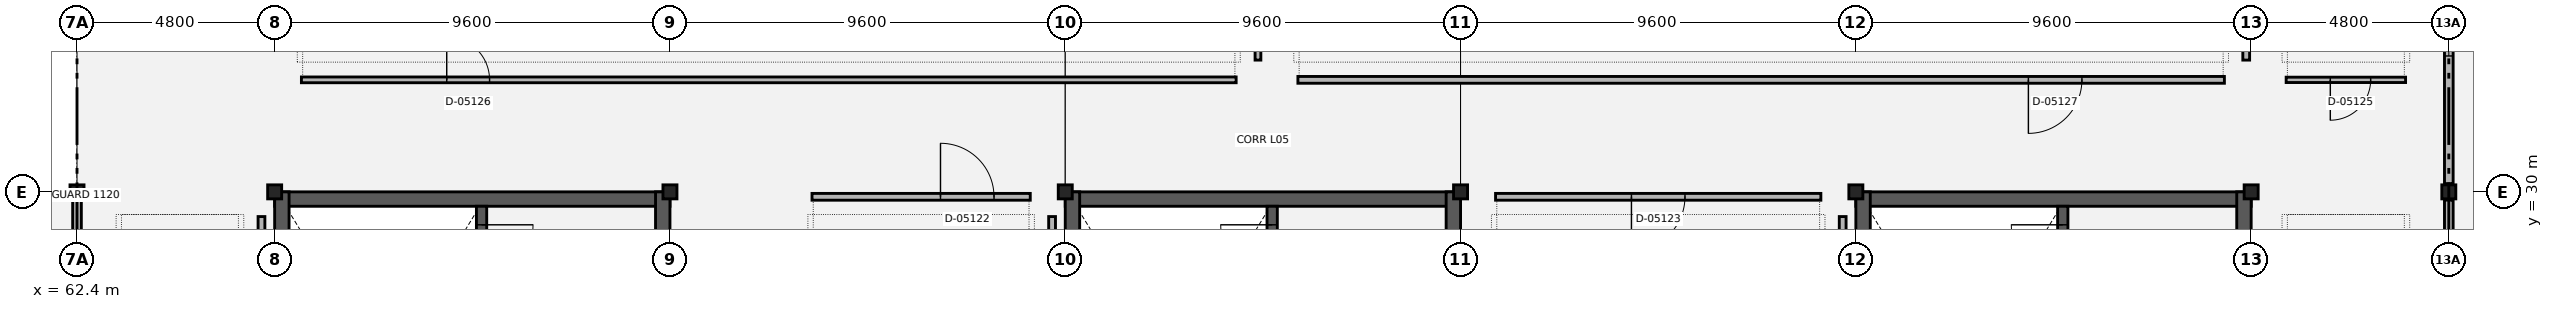
"""IFC4 building model, lengths in metres.
Left out: names, types, materials, properties, quantities, classifications, styles, units other than length and angle.
Written with IfcOpenShell. Run it as: python <this file> out.ifc"""

import sys

from ifc_helpers import new_model, si_unit, direction, frame, frame_2d, origin, origin_2d, place, context, subcontext, project, spatial, rectangle, extrude, element, fill, save


model = new_model("IFC4")
c1 = context("Model", 3, precision=1e-05, world=origin(), true_north=direction((0.0, 1.0)))
c2 = subcontext(c1, "Body", "Model", "MODEL_VIEW")
j1 = project(units=[si_unit("LENGTHUNIT", "METRE"), si_unit("PLANEANGLEUNIT", "RADIAN")], contexts=[c1])
p1 = place(None, origin())
s1 = spatial("IfcSite", under=j1, at=p1, CompositionType="ELEMENT")
p2 = place(p1, origin())
s2 = spatial("IfcBuilding", under=s1, at=p2, CompositionType="ELEMENT")
p3 = place(p2, frame((0.0, 0.0, 22.8)))
s3 = spatial("IfcBuildingStorey", under=s2, at=p3, CompositionType="ELEMENT", Elevation=22.8)
for number, where, z_axis, x_axis in (
    (1, (62.4, 30.0, 0.0), (0.0, 0.0, 1.0), (1.0, 0.0, 0.0)),
    (2, (67.2, 30.0, 0.0), (0.0, 0.0, 1.0), (1.0, 0.0, 0.0)),
    (3, (76.8, 30.0, 0.0), (0.0, 0.0, 1.0), (1.0, 0.0, 0.0)),
    (4, (86.4, 30.0, 0.0), (0.0, 0.0, 1.0), (1.0, 0.0, 0.0)),
    (5, (96.0, 30.0, 0.0), (0.0, 0.0, 1.0), (1.0, 0.0, 0.0)),
    (6, (105.6, 30.0, 0.0), (0.0, 0.0, 1.0), (1.0, 0.0, 0.0)),
    (7, (115.2, 30.0, 0.0), (0.0, 0.0, 1.0), (1.0, 0.0, 0.0)),
    (8, (120.0, 30.0, 0.0), (0.0, 0.0, 1.0), (1.0, 0.0, 0.0)),
):
    element("IfcColumn", number, at=place(p3, frame(where, z_axis=z_axis, x_axis=x_axis)), inside=s3, PredefinedType="COLUMN", context=c2, shape_type="SweptSolid", body=[
        extrude(rectangle(XDim=0.34, YDim=0.34, at=origin_2d()), origin(), (0.0, 0.0, 1.0), 4.2),
    ])
p4 = place(p3, frame((62.4, 29.8, 0.0), z_axis=(0.0, 0.0, 1.0), x_axis=(0.0, -1.0, 0.0)))
e9 = element("IfcWall", 9, at=p4, inside=s3, PredefinedType="SOLIDWALL", context=c2, shape_type="SweptSolid", body=[
    extrude(rectangle(XDim=8.0, YDim=0.21, at=frame_2d((4.0, 0.0))), origin(), (0.0, 0.0, 1.0), 3.07),
])
p5 = place(p4, frame((3.4, 0.0, 0.0)))
e10 = element("IfcOpeningElement", 10, at=p5, cuts=e9, PredefinedType="OPENING", context=c2, shape_type="SweptSolid", body=[
    extrude(rectangle(XDim=1.2, YDim=2.15, at=frame_2d((0.6, 1.075))), frame((0.0, 0.115, 0.0), z_axis=(0.0, -1.0, 0.0), x_axis=(1.0, 0.0, 0.0)), (0.0, 0.0, 1.0), 0.23),
])
p6 = place(p3, frame((120.0, 21.8, 0.0), z_axis=(0.0, 0.0, 1.0), x_axis=(0.0, 1.0, 0.0)))
e11 = element("IfcWall", 11, at=p6, inside=s3, PredefinedType="SOLIDWALL", context=c2, shape_type="SweptSolid", body=[
    extrude(rectangle(XDim=8.0, YDim=0.21, at=frame_2d((4.0, 0.0))), origin(), (0.0, 0.0, 1.0), 3.07),
])
p7 = place(p6, frame((3.1, 0.0, 0.9)))
e12 = element("IfcOpeningElement", 12, at=p7, cuts=e11, PredefinedType="OPENING", context=c2, shape_type="SweptSolid", body=[
    extrude(rectangle(XDim=1.8, YDim=1.5, at=frame_2d((0.9, 0.75))), frame((0.0, 0.115, 0.0), z_axis=(0.0, -1.0, 0.0), x_axis=(1.0, 0.0, 0.0)), (0.0, 0.0, 1.0), 0.23),
])
p8 = place(p3, frame((120.0, 30.2, 0.0), z_axis=(0.0, 0.0, 1.0), x_axis=(0.0, 1.0, 0.0)))
e13 = element("IfcWall", 13, at=p8, inside=s3, PredefinedType="SOLIDWALL", context=c2, shape_type="SweptSolid", body=[
    extrude(rectangle(XDim=8.0, YDim=0.21, at=frame_2d((4.0, 0.0))), origin(), (0.0, 0.0, 1.0), 3.07),
])
p9 = place(p8, frame((3.1, 0.0, 0.9)))
e14 = element("IfcOpeningElement", 14, at=p9, cuts=e13, PredefinedType="OPENING", context=c2, shape_type="SweptSolid", body=[
    extrude(rectangle(XDim=1.8, YDim=1.5, at=frame_2d((0.9, 0.75))), frame((0.0, 0.115, 0.0), z_axis=(0.0, -1.0, 0.0), x_axis=(1.0, 0.0, 0.0)), (0.0, 0.0, 1.0), 0.23),
])
p10 = place(p3, frame((67.2, 29.825, 0.0), z_axis=(0.0, 0.0, 1.0), x_axis=(1.0, 0.0, 0.0)))
e15 = element("IfcWall", 15, at=p10, inside=s3, PredefinedType="SHEAR", context=c2, shape_type="SweptSolid", body=[
    extrude(rectangle(XDim=9.6, YDim=0.35, at=frame_2d((4.8, 0.0))), origin(), (0.0, 0.0, 1.0), 3.97),
])
p11 = place(p3, frame((67.375, 21.6, 0.0), z_axis=(0.0, 0.0, 1.0), x_axis=(0.0, 1.0, 0.0)))
e16 = element("IfcWall", 16, at=p11, inside=s3, PredefinedType="SHEAR", context=c2, shape_type="SweptSolid", body=[
    extrude(rectangle(XDim=8.4, YDim=0.35, at=frame_2d((4.2, 0.0))), origin(), (0.0, 0.0, 1.0), 3.97),
])
p12 = place(p3, frame((76.625, 21.6, 0.0), z_axis=(0.0, 0.0, 1.0), x_axis=(0.0, 1.0, 0.0)))
e17 = element("IfcWall", 17, at=p12, inside=s3, PredefinedType="SHEAR", context=c2, shape_type="SweptSolid", body=[
    extrude(rectangle(XDim=8.4, YDim=0.35, at=frame_2d((4.2, 0.0))), origin(), (0.0, 0.0, 1.0), 3.97),
])
p13 = place(p12, frame((5.3, 0.0, 0.0)))
e18 = element("IfcOpeningElement", 18, at=p13, cuts=e17, PredefinedType="OPENING", context=c2, shape_type="SweptSolid", body=[
    extrude(rectangle(XDim=1.4, YDim=2.15, at=frame_2d((0.7, 1.075))), frame((0.0, 0.185, 0.0), z_axis=(0.0, -1.0, 0.0), x_axis=(1.0, 0.0, 0.0)), (0.0, 0.0, 1.0), 0.37),
])
p14 = place(p3, frame((72.225, 29.65, 0.0), z_axis=(0.0, 0.0, 1.0), x_axis=(0.0, -1.0, 0.0)))
e19 = element("IfcWall", 19, at=p14, inside=s3, PredefinedType="SHEAR", context=c2, shape_type="SweptSolid", body=[
    extrude(rectangle(XDim=7.7, YDim=0.25, at=frame_2d((3.85, 0.0))), origin(), (0.0, 0.0, 1.0), 3.97),
])
p15 = place(p14, frame((0.45, 0.0, 0.0)))
e20 = element("IfcOpeningElement", 20, at=p15, cuts=e19, PredefinedType="OPENING", context=c2, shape_type="SweptSolid", body=[
    extrude(rectangle(XDim=1.25, YDim=2.15, at=frame_2d((0.625, 1.075))), frame((0.0, 0.135, 0.0), z_axis=(0.0, -1.0, 0.0), x_axis=(1.0, 0.0, 0.0)), (0.0, 0.0, 1.0), 0.27),
])
p16 = place(p3, frame((105.6, 29.825, 0.0), z_axis=(0.0, 0.0, 1.0), x_axis=(1.0, 0.0, 0.0)))
e21 = element("IfcWall", 21, at=p16, inside=s3, PredefinedType="SHEAR", context=c2, shape_type="SweptSolid", body=[
    extrude(rectangle(XDim=9.6, YDim=0.35, at=frame_2d((4.8, 0.0))), origin(), (0.0, 0.0, 1.0), 3.97),
])
p17 = place(p3, frame((105.775, 21.6, 0.0), z_axis=(0.0, 0.0, 1.0), x_axis=(0.0, 1.0, 0.0)))
e22 = element("IfcWall", 22, at=p17, inside=s3, PredefinedType="SHEAR", context=c2, shape_type="SweptSolid", body=[
    extrude(rectangle(XDim=8.4, YDim=0.35, at=frame_2d((4.2, 0.0))), origin(), (0.0, 0.0, 1.0), 3.97),
])
p18 = place(p3, frame((115.025, 21.6, 0.0), z_axis=(0.0, 0.0, 1.0), x_axis=(0.0, 1.0, 0.0)))
e23 = element("IfcWall", 23, at=p18, inside=s3, PredefinedType="SHEAR", context=c2, shape_type="SweptSolid", body=[
    extrude(rectangle(XDim=8.4, YDim=0.35, at=frame_2d((4.2, 0.0))), origin(), (0.0, 0.0, 1.0), 3.97),
])
p19 = place(p18, frame((5.3, 0.0, 0.0)))
e24 = element("IfcOpeningElement", 24, at=p19, cuts=e23, PredefinedType="OPENING", context=c2, shape_type="SweptSolid", body=[
    extrude(rectangle(XDim=1.4, YDim=2.15, at=frame_2d((0.7, 1.075))), frame((0.0, 0.185, 0.0), z_axis=(0.0, -1.0, 0.0), x_axis=(1.0, 0.0, 0.0)), (0.0, 0.0, 1.0), 0.37),
])
p20 = place(p3, frame((110.625, 29.65, 0.0), z_axis=(0.0, 0.0, 1.0), x_axis=(0.0, -1.0, 0.0)))
e25 = element("IfcWall", 25, at=p20, inside=s3, PredefinedType="SHEAR", context=c2, shape_type="SweptSolid", body=[
    extrude(rectangle(XDim=7.7, YDim=0.25, at=frame_2d((3.85, 0.0))), origin(), (0.0, 0.0, 1.0), 3.97),
])
p21 = place(p20, frame((0.45, 0.0, 0.0)))
e26 = element("IfcOpeningElement", 26, at=p21, cuts=e25, PredefinedType="OPENING", context=c2, shape_type="SweptSolid", body=[
    extrude(rectangle(XDim=1.25, YDim=2.15, at=frame_2d((0.625, 1.075))), frame((0.0, 0.135, 0.0), z_axis=(0.0, -1.0, 0.0), x_axis=(1.0, 0.0, 0.0)), (0.0, 0.0, 1.0), 0.27),
])
p22 = place(p3, frame((86.4, 29.825, 0.0), z_axis=(0.0, 0.0, 1.0), x_axis=(1.0, 0.0, 0.0)))
e27 = element("IfcWall", 27, at=p22, inside=s3, PredefinedType="SHEAR", context=c2, shape_type="SweptSolid", body=[
    extrude(rectangle(XDim=9.6, YDim=0.35, at=frame_2d((4.8, 0.0))), origin(), (0.0, 0.0, 1.0), 3.97),
])
p23 = place(p3, frame((86.575, 21.6, 0.0), z_axis=(0.0, 0.0, 1.0), x_axis=(0.0, 1.0, 0.0)))
e28 = element("IfcWall", 28, at=p23, inside=s3, PredefinedType="SHEAR", context=c2, shape_type="SweptSolid", body=[
    extrude(rectangle(XDim=8.4, YDim=0.35, at=frame_2d((4.2, 0.0))), origin(), (0.0, 0.0, 1.0), 3.97),
])
p24 = place(p3, frame((95.825, 21.6, 0.0), z_axis=(0.0, 0.0, 1.0), x_axis=(0.0, 1.0, 0.0)))
e29 = element("IfcWall", 29, at=p24, inside=s3, PredefinedType="SHEAR", context=c2, shape_type="SweptSolid", body=[
    extrude(rectangle(XDim=8.4, YDim=0.35, at=frame_2d((4.2, 0.0))), origin(), (0.0, 0.0, 1.0), 3.97),
])
p25 = place(p24, frame((5.3, 0.0, 0.0)))
e30 = element("IfcOpeningElement", 30, at=p25, cuts=e29, PredefinedType="OPENING", context=c2, shape_type="SweptSolid", body=[
    extrude(rectangle(XDim=1.4, YDim=2.15, at=frame_2d((0.7, 1.075))), frame((0.0, 0.185, 0.0), z_axis=(0.0, -1.0, 0.0), x_axis=(1.0, 0.0, 0.0)), (0.0, 0.0, 1.0), 0.37),
])
p26 = place(p3, frame((91.425, 29.65, 0.0), z_axis=(0.0, 0.0, 1.0), x_axis=(0.0, -1.0, 0.0)))
e31 = element("IfcWall", 31, at=p26, inside=s3, PredefinedType="SHEAR", context=c2, shape_type="SweptSolid", body=[
    extrude(rectangle(XDim=7.7, YDim=0.25, at=frame_2d((3.85, 0.0))), origin(), (0.0, 0.0, 1.0), 3.97),
])
p27 = place(p26, frame((0.45, 0.0, 0.0)))
e32 = element("IfcOpeningElement", 32, at=p27, cuts=e31, PredefinedType="OPENING", context=c2, shape_type="SweptSolid", body=[
    extrude(rectangle(XDim=1.25, YDim=2.15, at=frame_2d((0.625, 1.075))), frame((0.0, 0.135, 0.0), z_axis=(0.0, -1.0, 0.0), x_axis=(1.0, 0.0, 0.0)), (0.0, 0.0, 1.0), 0.27),
])
p28 = place(p3, frame((66.88, 22.4, 0.0), z_axis=(0.0, 0.0, 1.0), x_axis=(0.0, 1.0, 0.0)))
e33 = element("IfcWall", 33, at=p28, inside=s3, PredefinedType="PARTITIONING", context=c2, shape_type="SweptSolid", body=[
    extrude(rectangle(XDim=7.0, YDim=0.165, at=frame_2d((3.5, 0.0))), origin(), (0.0, 0.0, 1.0), 3.05),
])
p29 = place(p3, frame((80.25, 29.88, 0.0), z_axis=(0.0, 0.0, 1.0), x_axis=(1.0, 0.0, 0.0)))
e34 = element("IfcWall", 34, at=p29, inside=s3, PredefinedType="PARTITIONING", context=c2, shape_type="SweptSolid", body=[
    extrude(rectangle(XDim=5.3, YDim=0.165, at=frame_2d((2.65, 0.0))), origin(), (0.0, 0.0, 1.0), 3.05),
])
p30 = place(p29, frame((3.12, 0.0, 0.0)))
e35 = element("IfcOpeningElement", 35, at=p30, cuts=e34, PredefinedType="OPENING", context=c2, shape_type="SweptSolid", body=[
    extrude(rectangle(XDim=1.3, YDim=2.15, at=frame_2d((0.65, 1.075))), frame((0.0, 0.093, 0.0), z_axis=(0.0, -1.0, 0.0), x_axis=(1.0, 0.0, 0.0)), (0.0, 0.0, 1.0), 0.185),
])
p31 = place(p3, frame((86.08, 22.4, 0.0), z_axis=(0.0, 0.0, 1.0), x_axis=(0.0, 1.0, 0.0)))
e36 = element("IfcWall", 36, at=p31, inside=s3, PredefinedType="PARTITIONING", context=c2, shape_type="SweptSolid", body=[
    extrude(rectangle(XDim=7.0, YDim=0.165, at=frame_2d((3.5, 0.0))), origin(), (0.0, 0.0, 1.0), 3.05),
])
p32 = place(p3, frame((96.85, 29.88, 0.0), z_axis=(0.0, 0.0, 1.0), x_axis=(1.0, 0.0, 0.0)))
e37 = element("IfcWall", 37, at=p32, inside=s3, PredefinedType="PARTITIONING", context=c2, shape_type="SweptSolid", body=[
    extrude(rectangle(XDim=7.9, YDim=0.165, at=frame_2d((3.95, 0.0))), origin(), (0.0, 0.0, 1.0), 3.05),
])
p33 = place(p32, frame((3.3, 0.0, 0.0)))
e38 = element("IfcOpeningElement", 38, at=p33, cuts=e37, PredefinedType="OPENING", context=c2, shape_type="SweptSolid", body=[
    extrude(rectangle(XDim=1.3, YDim=2.15, at=frame_2d((0.65, 1.075))), frame((0.0, 0.093, 0.0), z_axis=(0.0, -1.0, 0.0), x_axis=(1.0, 0.0, 0.0)), (0.0, 0.0, 1.0), 0.185),
])
p34 = place(p3, frame((105.28, 22.4, 0.0), z_axis=(0.0, 0.0, 1.0), x_axis=(0.0, 1.0, 0.0)))
e39 = element("IfcWall", 39, at=p34, inside=s3, PredefinedType="PARTITIONING", context=c2, shape_type="SweptSolid", body=[
    extrude(rectangle(XDim=7.0, YDim=0.165, at=frame_2d((3.5, 0.0))), origin(), (0.0, 0.0, 1.0), 3.05),
])
p35 = place(p3, frame((116.05, 32.72, 0.0), z_axis=(0.0, 0.0, 1.0), x_axis=(1.0, 0.0, 0.0)))
e40 = element("IfcWall", 40, at=p35, inside=s3, PredefinedType="PARTITIONING", context=c2, shape_type="SweptSolid", body=[
    extrude(rectangle(XDim=2.9, YDim=0.13, at=frame_2d((1.45, 0.0))), origin(), (0.0, 0.0, 1.0), 3.05),
])
p36 = place(p35, frame((1.072, 0.0, 0.0)))
e41 = element("IfcOpeningElement", 41, at=p36, cuts=e40, PredefinedType="OPENING", context=c2, shape_type="SweptSolid", body=[
    extrude(rectangle(XDim=0.98, YDim=2.1, at=frame_2d((0.49, 1.05))), frame((0.0, 0.075, 0.0), z_axis=(0.0, -1.0, 0.0), x_axis=(1.0, 0.0, 0.0)), (0.0, 0.0, 1.0), 0.15),
])
p37 = place(p3, frame((67.85, 32.72, 0.0), z_axis=(0.0, 0.0, 1.0), x_axis=(1.0, 0.0, 0.0)))
e42 = element("IfcWall", 42, at=p37, inside=s3, PredefinedType="PARTITIONING", context=c2, shape_type="SweptSolid", body=[
    extrude(rectangle(XDim=22.7, YDim=0.14, at=frame_2d((11.35, 0.0))), origin(), (0.0, 0.0, 1.0), 3.05),
])
p38 = place(p37, frame((3.529, 0.0, 0.0)))
e43 = element("IfcOpeningElement", 43, at=p38, cuts=e42, PredefinedType="OPENING", context=c2, shape_type="SweptSolid", body=[
    extrude(rectangle(XDim=1.04, YDim=2.15, at=frame_2d((0.52, 1.075))), frame((0.0, 0.08, 0.0), z_axis=(0.0, -1.0, 0.0), x_axis=(1.0, 0.0, 0.0)), (0.0, 0.0, 1.0), 0.16),
])
p39 = place(p3, frame((91.08, 33.2, 0.0), z_axis=(0.0, 0.0, 1.0), x_axis=(0.0, 1.0, 0.0)))
e44 = element("IfcWall", 44, at=p39, inside=s3, PredefinedType="PARTITIONING", context=c2, shape_type="SweptSolid", body=[
    extrude(rectangle(XDim=4.2, YDim=0.14, at=frame_2d((2.1, 0.0))), origin(), (0.0, 0.0, 1.0), 3.05),
])
p40 = place(p3, frame((92.05, 32.72, 0.0), z_axis=(0.0, 0.0, 1.0), x_axis=(1.0, 0.0, 0.0)))
e45 = element("IfcWall", 45, at=p40, inside=s3, PredefinedType="PARTITIONING", context=c2, shape_type="SweptSolid", body=[
    extrude(rectangle(XDim=22.5, YDim=0.165, at=frame_2d((11.25, 0.0))), origin(), (0.0, 0.0, 1.0), 3.05),
])
p41 = place(p40, frame((17.74, 0.0, 0.0)))
e46 = element("IfcOpeningElement", 46, at=p41, cuts=e45, PredefinedType="OPENING", context=c2, shape_type="SweptSolid", body=[
    extrude(rectangle(XDim=1.3, YDim=2.15, at=frame_2d((0.65, 1.075))), frame((0.0, 0.093, 0.0), z_axis=(0.0, -1.0, 0.0), x_axis=(1.0, 0.0, 0.0)), (0.0, 0.0, 1.0), 0.185),
])
p42 = place(p3, frame((115.08, 33.2, 0.0), z_axis=(0.0, 0.0, 1.0), x_axis=(0.0, 1.0, 0.0)))
e47 = element("IfcWall", 47, at=p42, inside=s3, PredefinedType="PARTITIONING", context=c2, shape_type="SweptSolid", body=[
    extrude(rectangle(XDim=4.2, YDim=0.165, at=frame_2d((2.1, 0.0))), origin(), (0.0, 0.0, 1.0), 3.05),
])
p43 = place(p9, origin())
e48 = element("IfcWindow", 48, at=p43, inside=s3, PartitioningType="SINGLE_PANEL", PredefinedType="WINDOW", context=c2, shape_type="SweptSolid", body=[
    extrude(rectangle(XDim=1.8, YDim=1.5, at=frame_2d((0.9, 0.75))), frame((0.0, 0.03, 0.0), z_axis=(0.0, -1.0, 0.0), x_axis=(1.0, 0.0, 0.0)), (0.0, 0.0, 1.0), 0.06),
])
fill(e14, e48)
p44 = place(p15, origin())
e49 = element("IfcDoor", 49, at=p44, inside=s3, OperationType="SINGLE_SWING_LEFT", PredefinedType="DOOR", context=c2, shape_type="SweptSolid", body=[
    extrude(rectangle(XDim=1.25, YDim=2.15, at=frame_2d((0.625, 1.075))), frame((0.0, 0.025, 0.0), z_axis=(0.0, -1.0, 0.0), x_axis=(1.0, 0.0, 0.0)), (0.0, 0.0, 1.0), 0.05),
])
fill(e20, e49)
p45 = place(p21, origin())
e50 = element("IfcDoor", 50, at=p45, inside=s3, OperationType="SINGLE_SWING_RIGHT", PredefinedType="DOOR", context=c2, shape_type="SweptSolid", body=[
    extrude(rectangle(XDim=1.25, YDim=2.15, at=frame_2d((0.625, 1.075))), frame((0.0, 0.025, 0.0), z_axis=(0.0, -1.0, 0.0), x_axis=(1.0, 0.0, 0.0)), (0.0, 0.0, 1.0), 0.05),
])
fill(e26, e50)
p46 = place(p27, origin())
e51 = element("IfcDoor", 51, at=p46, inside=s3, OperationType="SINGLE_SWING_RIGHT", PredefinedType="DOOR", context=c2, shape_type="SweptSolid", body=[
    extrude(rectangle(XDim=1.25, YDim=2.15, at=frame_2d((0.625, 1.075))), frame((0.0, 0.025, 0.0), z_axis=(0.0, -1.0, 0.0), x_axis=(1.0, 0.0, 0.0)), (0.0, 0.0, 1.0), 0.05),
])
fill(e32, e51)
p47 = place(p30, origin())
e52 = element("IfcDoor", 52, at=p47, inside=s3, OperationType="SINGLE_SWING_LEFT", PredefinedType="DOOR", context=c2, shape_type="SweptSolid", body=[
    extrude(rectangle(XDim=1.3, YDim=2.15, at=frame_2d((0.65, 1.075))), frame((0.0, 0.025, 0.0), z_axis=(0.0, -1.0, 0.0), x_axis=(1.0, 0.0, 0.0)), (0.0, 0.0, 1.0), 0.05),
])
fill(e35, e52)
p48 = place(p33, origin())
e53 = element("IfcDoor", 53, at=p48, inside=s3, OperationType="SINGLE_SWING_RIGHT", PredefinedType="DOOR", context=c2, shape_type="SweptSolid", body=[
    extrude(rectangle(XDim=1.3, YDim=2.15, at=frame_2d((0.65, 1.075))), frame((0.0, 0.025, 0.0), z_axis=(0.0, -1.0, 0.0), x_axis=(1.0, 0.0, 0.0)), (0.0, 0.0, 1.0), 0.05),
])
fill(e38, e53)
p49 = place(p36, origin())
e54 = element("IfcDoor", 54, at=p49, inside=s3, OperationType="SINGLE_SWING_RIGHT", PredefinedType="DOOR", context=c2, shape_type="SweptSolid", body=[
    extrude(rectangle(XDim=0.98, YDim=2.1, at=frame_2d((0.49, 1.05))), frame((0.0, 0.025, 0.0), z_axis=(0.0, -1.0, 0.0), x_axis=(1.0, 0.0, 0.0)), (0.0, 0.0, 1.0), 0.05),
])
fill(e41, e54)
p50 = place(p38, origin())
e55 = element("IfcDoor", 55, at=p50, inside=s3, OperationType="SINGLE_SWING_LEFT", PredefinedType="DOOR", context=c2, shape_type="SweptSolid", body=[
    extrude(rectangle(XDim=1.04, YDim=2.15, at=frame_2d((0.52, 1.075))), frame((0.0, 0.025, 0.0), z_axis=(0.0, -1.0, 0.0), x_axis=(1.0, 0.0, 0.0)), (0.0, 0.0, 1.0), 0.05),
])
fill(e43, e55)
p51 = place(p41, origin())
e56 = element("IfcDoor", 56, at=p51, inside=s3, OperationType="SINGLE_SWING_RIGHT", PredefinedType="DOOR", context=c2, shape_type="SweptSolid", body=[
    extrude(rectangle(XDim=1.3, YDim=2.15, at=frame_2d((0.65, 1.075))), frame((0.0, 0.025, 0.0), z_axis=(0.0, -1.0, 0.0), x_axis=(1.0, 0.0, 0.0)), (0.0, 0.0, 1.0), 0.05),
])
fill(e46, e56)
save(model, sys.argv[1])
